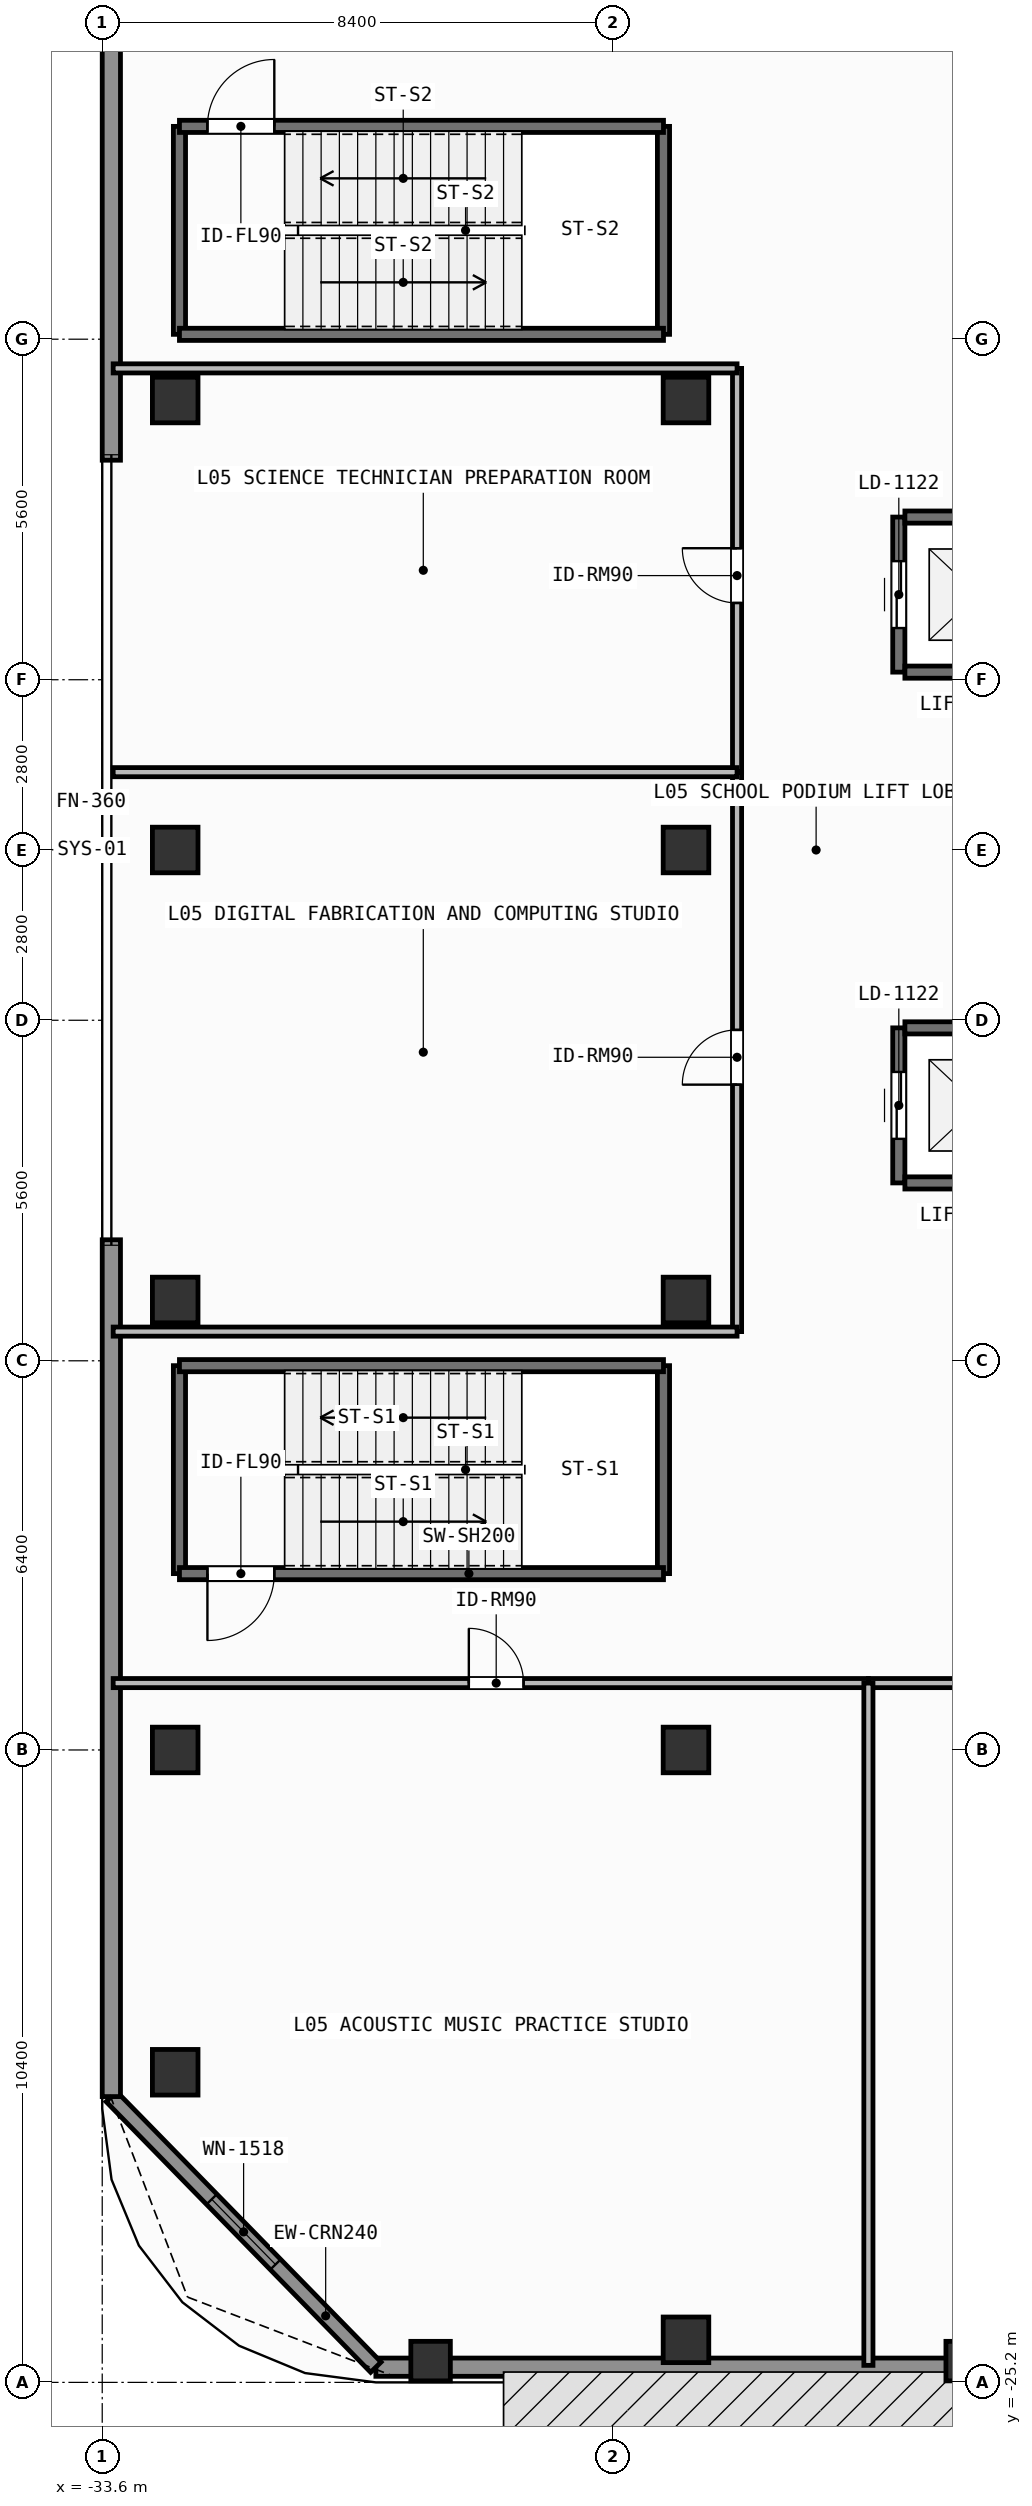
"""IFC4 building model, lengths in metres.
Left out: names, types, materials, properties, quantities, classifications, styles, units other than length and angle.
Written with IfcOpenShell. Run it as: python <this file> out.ifc"""

import sys

from ifc_helpers import new_model, si_unit, direction, frame, frame_2d, origin, origin_2d, place, context, subcontext, project, spatial, rectangle, extrude, element, fill, save


model = new_model("IFC4")
c1 = context("Model", 3, precision=1e-05, world=origin(), true_north=direction((0.0, 1.0)))
c2 = subcontext(c1, "Body", "Model", "MODEL_VIEW")
j1 = project(units=[si_unit("LENGTHUNIT", "METRE"), si_unit("PLANEANGLEUNIT", "RADIAN")], contexts=[c1])
p1 = place(None, origin())
s1 = spatial("IfcSite", under=j1, at=p1, CompositionType="ELEMENT")
p2 = place(p1, origin())
s2 = spatial("IfcBuilding", under=s1, at=p2, CompositionType="ELEMENT")
p3 = place(p2, frame((0.0, 0.0, 17.4)))
s3 = spatial("IfcBuildingStorey", under=s2, at=p3, CompositionType="ELEMENT", Elevation=17.4)
for number, where, z_axis, x_axis in (
    (1, (-32.4, -14.8, 0.0), (0.0, 0.0, 1.0), (1.0, 0.0, 0.0)),
    (2, (-32.4, -7.4, 0.0), (0.0, 0.0, 1.0), (1.0, 0.0, 0.0)),
    (3, (-32.4, 0.0, 0.0), (0.0, 0.0, 1.0), (1.0, 0.0, 0.0)),
    (4, (-32.4, 7.4, 0.0), (0.0, 0.0, 1.0), (1.0, 0.0, 0.0)),
    (5, (-24.0, -24.5, 0.0), (0.0, 0.0, 1.0), (1.0, 0.0, 0.0)),
    (6, (-24.0, -14.8, 0.0), (0.0, 0.0, 1.0), (1.0, 0.0, 0.0)),
    (7, (-24.0, -7.4, 0.0), (0.0, 0.0, 1.0), (1.0, 0.0, 0.0)),
    (8, (-24.0, 0.0, 0.0), (0.0, 0.0, 1.0), (1.0, 0.0, 0.0)),
    (9, (-24.0, 7.4, 0.0), (0.0, 0.0, 1.0), (1.0, 0.0, 0.0)),
    (10, (-32.4, -20.1, 0.0), (0.0, 0.0, 1.0), (1.0, 0.0, 0.0)),
):
    element("IfcColumn", number, at=place(p3, frame(where, z_axis=z_axis, x_axis=x_axis)), inside=s3, PredefinedType="COLUMN", context=c2, shape_type="SweptSolid", body=[
        extrude(rectangle(XDim=0.75, YDim=0.75, at=origin_2d()), origin(), (0.0, 0.0, 1.0), 4.2),
    ])
for number, where, z_axis, x_axis in (
    (11, (-28.2, -24.85, 0.0), (0.0, 0.0, 1.0), (1.0, 0.0, 0.0)),
    (12, (-19.4, -24.85, 0.0), (0.0, 0.0, 1.0), (1.0, 0.0, 0.0)),
):
    element("IfcColumn", number, at=place(p3, frame(where, z_axis=z_axis, x_axis=x_axis)), inside=s3, PredefinedType="PILASTER", context=c2, shape_type="SweptSolid", body=[
        extrude(rectangle(XDim=0.65, YDim=0.65, at=origin_2d()), origin(), (0.0, 0.0, 1.0), 4.2),
    ])
p4 = place(p3, frame((29.1, -24.95, 0.0), z_axis=(0.0, 0.0, 1.0), x_axis=(-1.0, 0.0, 0.0)))
e13 = element("IfcWall", 13, at=p4, inside=s3, PredefinedType="SOLIDWALL", context=c2, shape_type="SweptSolid", body=[
    extrude(rectangle(XDim=58.2, YDim=0.3, at=frame_2d((29.1, 0.0))), origin(), (0.0, 0.0, 1.0), 3.96),
])
p5 = place(p4, frame((39.825, 0.0, 0.85)))
e14 = element("IfcOpeningElement", 14, at=p5, cuts=e13, PredefinedType="OPENING", context=c2, shape_type="SweptSolid", body=[
    extrude(rectangle(XDim=2.1, YDim=2.2, at=frame_2d((1.05, 1.1))), frame((0.0, 0.16, 0.0), z_axis=(0.0, -1.0, 0.0), x_axis=(1.0, 0.0, 0.0)), (0.0, 0.0, 1.0), 0.32),
])
p6 = place(p4, frame((31.75, 0.0, 0.85)))
e15 = element("IfcOpeningElement", 15, at=p6, cuts=e13, PredefinedType="OPENING", context=c2, shape_type="SweptSolid", body=[
    extrude(rectangle(XDim=2.1, YDim=2.2, at=frame_2d((1.05, 1.1))), frame((0.0, 0.16, 0.0), z_axis=(0.0, -1.0, 0.0), x_axis=(1.0, 0.0, 0.0)), (0.0, 0.0, 1.0), 0.32),
])
p7 = place(p4, frame((24.35, 0.0, 0.85)))
e16 = element("IfcOpeningElement", 16, at=p7, cuts=e13, PredefinedType="OPENING", context=c2, shape_type="SweptSolid", body=[
    extrude(rectangle(XDim=2.1, YDim=2.2, at=frame_2d((1.05, 1.1))), frame((0.0, 0.16, 0.0), z_axis=(0.0, -1.0, 0.0), x_axis=(1.0, 0.0, 0.0)), (0.0, 0.0, 1.0), 0.32),
])
p8 = place(p4, frame((18.425, 0.0, 0.85)))
e17 = element("IfcOpeningElement", 17, at=p8, cuts=e13, PredefinedType="OPENING", context=c2, shape_type="SweptSolid", body=[
    extrude(rectangle(XDim=2.1, YDim=2.2, at=frame_2d((1.05, 1.1))), frame((0.0, 0.16, 0.0), z_axis=(0.0, -1.0, 0.0), x_axis=(1.0, 0.0, 0.0)), (0.0, 0.0, 1.0), 0.32),
])
p9 = place(p3, frame((-29.1, -24.95, 0.0), z_axis=(0.0, 0.0, 1.0), x_axis=(-0.69901822973, 0.715103848756, 0.0)))
e18 = element("IfcWall", 18, at=p9, inside=s3, PredefinedType="SOLIDWALL", context=c2, shape_type="SweptSolid", body=[
    extrude(rectangle(XDim=6.223, YDim=0.24, at=frame_2d((3.111, 0.0))), origin(), (0.0, 0.0, 1.0), 3.96),
])
p10 = place(p9, frame((2.362, 0.0, 0.85)))
e19 = element("IfcOpeningElement", 19, at=p10, cuts=e18, PredefinedType="OPENING", context=c2, shape_type="SweptSolid", body=[
    extrude(rectangle(XDim=1.5, YDim=1.85, at=frame_2d((0.75, 0.925))), frame((0.0, 0.13, 0.0), z_axis=(0.0, -1.0, 0.0), x_axis=(1.0, 0.0, 0.0)), (0.0, 0.0, 1.0), 0.26),
])
for number, where, z_axis, x_axis in (
    (20, (-33.45, -20.5, 0.0), (0.0, 0.0, 1.0), (0.0, 1.0, 0.0)),
    (21, (-33.45, 6.41, 0.0), (0.0, 0.0, 1.0), (0.0, 1.0, 0.0)),
):
    element("IfcWall", number, at=place(p3, frame(where, z_axis=z_axis, x_axis=x_axis)), inside=s3, PredefinedType="SOLIDWALL", context=c2, shape_type="SweptSolid", body=[
        extrude(rectangle(XDim=14.09, YDim=0.3, at=frame_2d((7.045, 0.0))), origin(), (0.0, 0.0, 1.0), 3.96),
    ])
p11 = place(p3, frame((-20.5, -5.475, 0.0), z_axis=(0.0, 0.0, 1.0), x_axis=(0.0, 1.0, 0.0)))
e22 = element("IfcWall", 22, at=p11, inside=s3, PredefinedType="SHEAR", context=c2, shape_type="SweptSolid", body=[
    extrude(rectangle(XDim=2.55, YDim=0.2, at=frame_2d((1.275, 0.0))), origin(), (0.0, 0.0, 1.0), 3.96),
])
p12 = place(p11, frame((0.725, 0.0, 0.0)))
e23 = element("IfcOpeningElement", 23, at=p12, cuts=e22, PredefinedType="OPENING", context=c2, shape_type="SweptSolid", body=[
    extrude(rectangle(XDim=1.1, YDim=2.2, at=frame_2d((0.55, 1.1))), frame((0.0, 0.11, 0.0), z_axis=(0.0, -1.0, 0.0), x_axis=(1.0, 0.0, 0.0)), (0.0, 0.0, 1.0), 0.22),
])
for number, where, z_axis, x_axis in (
    (24, (-20.4, -5.475, 0.0), (0.0, 0.0, 1.0), (1.0, 0.0, 0.0)),
    (25, (-20.4, -2.925, 0.0), (0.0, 0.0, 1.0), (1.0, 0.0, 0.0)),
):
    element("IfcWall", number, at=place(p3, frame(where, z_axis=z_axis, x_axis=x_axis)), inside=s3, PredefinedType="SHEAR", context=c2, shape_type="SweptSolid", body=[
        extrude(rectangle(XDim=2.4, YDim=0.2, at=frame_2d((1.2, 0.0))), origin(), (0.0, 0.0, 1.0), 3.96),
    ])
p13 = place(p3, frame((-20.5, 2.925, 0.0), z_axis=(0.0, 0.0, 1.0), x_axis=(0.0, 1.0, 0.0)))
e26 = element("IfcWall", 26, at=p13, inside=s3, PredefinedType="SHEAR", context=c2, shape_type="SweptSolid", body=[
    extrude(rectangle(XDim=2.55, YDim=0.2, at=frame_2d((1.275, 0.0))), origin(), (0.0, 0.0, 1.0), 3.96),
])
p14 = place(p13, frame((0.725, 0.0, 0.0)))
e27 = element("IfcOpeningElement", 27, at=p14, cuts=e26, PredefinedType="OPENING", context=c2, shape_type="SweptSolid", body=[
    extrude(rectangle(XDim=1.1, YDim=2.2, at=frame_2d((0.55, 1.1))), frame((0.0, 0.11, 0.0), z_axis=(0.0, -1.0, 0.0), x_axis=(1.0, 0.0, 0.0)), (0.0, 0.0, 1.0), 0.22),
])
for number, where, z_axis, x_axis in (
    (28, (-20.4, 2.925, 0.0), (0.0, 0.0, 1.0), (1.0, 0.0, 0.0)),
    (29, (-20.4, 5.475, 0.0), (0.0, 0.0, 1.0), (1.0, 0.0, 0.0)),
):
    element("IfcWall", number, at=place(p3, frame(where, z_axis=z_axis, x_axis=x_axis)), inside=s3, PredefinedType="SHEAR", context=c2, shape_type="SweptSolid", body=[
        extrude(rectangle(XDim=2.4, YDim=0.2, at=frame_2d((1.2, 0.0))), origin(), (0.0, 0.0, 1.0), 3.96),
    ])
for number, where, z_axis, x_axis in (
    (30, (-32.33, -11.9, 0.0), (0.0, 0.0, 1.0), (0.0, 1.0, 0.0)),
    (31, (-24.37, -8.48, 0.0), (0.0, 0.0, 1.0), (0.0, -1.0, 0.0)),
):
    element("IfcWall", number, at=place(p3, frame(where, z_axis=z_axis, x_axis=x_axis)), inside=s3, PredefinedType="SHEAR", context=c2, shape_type="SweptSolid", body=[
        extrude(rectangle(XDim=3.42, YDim=0.2, at=frame_2d((1.71, 0.0))), origin(), (0.0, 0.0, 1.0), 3.96),
    ])
p15 = place(p3, frame((-24.37, -11.9, 0.0), z_axis=(0.0, 0.0, 1.0), x_axis=(-1.0, 0.0, 0.0)))
e32 = element("IfcWall", 32, at=p15, inside=s3, PredefinedType="SHEAR", context=c2, shape_type="SweptSolid", body=[
    extrude(rectangle(XDim=7.96, YDim=0.2, at=frame_2d((3.98, 0.0))), origin(), (0.0, 0.0, 1.0), 3.96),
])
p16 = place(p15, frame((6.4, 0.0, 0.0)))
e33 = element("IfcOpeningElement", 33, at=p16, cuts=e32, PredefinedType="OPENING", context=c2, shape_type="SweptSolid", body=[
    extrude(rectangle(XDim=1.1, YDim=2.15, at=frame_2d((0.55, 1.075))), frame((0.0, 0.11, 0.0), z_axis=(0.0, -1.0, 0.0), x_axis=(1.0, 0.0, 0.0)), (0.0, 0.0, 1.0), 0.22),
])
p17 = place(p3, frame((-32.33, -8.48, 0.0), z_axis=(0.0, 0.0, 1.0), x_axis=(1.0, 0.0, 0.0)))
e34 = element("IfcWall", 34, at=p17, inside=s3, PredefinedType="SHEAR", context=c2, shape_type="SweptSolid", body=[
    extrude(rectangle(XDim=7.96, YDim=0.2, at=frame_2d((3.98, 0.0))), origin(), (0.0, 0.0, 1.0), 3.96),
])
for number, where, z_axis, x_axis in (
    (35, (-32.33, 8.48, 0.0), (0.0, 0.0, 1.0), (0.0, 1.0, 0.0)),
    (36, (-24.37, 11.9, 0.0), (0.0, 0.0, 1.0), (0.0, -1.0, 0.0)),
):
    element("IfcWall", number, at=place(p3, frame(where, z_axis=z_axis, x_axis=x_axis)), inside=s3, PredefinedType="SHEAR", context=c2, shape_type="SweptSolid", body=[
        extrude(rectangle(XDim=3.42, YDim=0.2, at=frame_2d((1.71, 0.0))), origin(), (0.0, 0.0, 1.0), 3.96),
    ])
p18 = place(p3, frame((-24.37, 8.48, 0.0), z_axis=(0.0, 0.0, 1.0), x_axis=(-1.0, 0.0, 0.0)))
e37 = element("IfcWall", 37, at=p18, inside=s3, PredefinedType="SHEAR", context=c2, shape_type="SweptSolid", body=[
    extrude(rectangle(XDim=7.96, YDim=0.2, at=frame_2d((3.98, 0.0))), origin(), (0.0, 0.0, 1.0), 3.96),
])
p19 = place(p3, frame((-32.33, 11.9, 0.0), z_axis=(0.0, 0.0, 1.0), x_axis=(1.0, 0.0, 0.0)))
e38 = element("IfcWall", 38, at=p19, inside=s3, PredefinedType="SHEAR", context=c2, shape_type="SweptSolid", body=[
    extrude(rectangle(XDim=7.96, YDim=0.2, at=frame_2d((3.98, 0.0))), origin(), (0.0, 0.0, 1.0), 3.96),
])
p20 = place(p19, frame((0.46, 0.0, 0.0)))
e39 = element("IfcOpeningElement", 39, at=p20, cuts=e38, PredefinedType="OPENING", context=c2, shape_type="SweptSolid", body=[
    extrude(rectangle(XDim=1.1, YDim=2.15, at=frame_2d((0.55, 1.075))), frame((0.0, 0.11, 0.0), z_axis=(0.0, -1.0, 0.0), x_axis=(1.0, 0.0, 0.0)), (0.0, 0.0, 1.0), 0.22),
])
p21 = place(p3, frame((-23.16, -7.92, 0.0), z_axis=(0.0, 0.0, 1.0), x_axis=(0.0, 1.0, 0.0)))
e40 = element("IfcWall", 40, at=p21, inside=s3, PredefinedType="PARTITIONING", context=c2, shape_type="SweptSolid", body=[
    extrude(rectangle(XDim=9.2, YDim=0.15, at=frame_2d((4.6, 0.0))), origin(), (0.0, 0.0, 1.0), 3.96),
])
p22 = place(p21, frame((4.061, 0.0, 0.0)))
e41 = element("IfcOpeningElement", 41, at=p22, cuts=e40, PredefinedType="OPENING", context=c2, shape_type="SweptSolid", body=[
    extrude(rectangle(XDim=0.9, YDim=2.1, at=frame_2d((0.45, 1.05))), frame((0.0, 0.085, 0.0), z_axis=(0.0, -1.0, 0.0), x_axis=(1.0, 0.0, 0.0)), (0.0, 0.0, 1.0), 0.17),
])
p23 = place(p3, frame((-23.16, 1.28, 0.0), z_axis=(0.0, 0.0, 1.0), x_axis=(0.0, 1.0, 0.0)))
e42 = element("IfcWall", 42, at=p23, inside=s3, PredefinedType="PARTITIONING", context=c2, shape_type="SweptSolid", body=[
    extrude(rectangle(XDim=6.64, YDim=0.15, at=frame_2d((3.32, 0.0))), origin(), (0.0, 0.0, 1.0), 3.96),
])
p24 = place(p23, frame((2.783, 0.0, 0.0)))
e43 = element("IfcOpeningElement", 43, at=p24, cuts=e42, PredefinedType="OPENING", context=c2, shape_type="SweptSolid", body=[
    extrude(rectangle(XDim=0.9, YDim=2.1, at=frame_2d((0.45, 1.05))), frame((0.0, 0.085, 0.0), z_axis=(0.0, -1.0, 0.0), x_axis=(1.0, 0.0, 0.0)), (0.0, 0.0, 1.0), 0.17),
])
p25 = place(p3, frame((-33.42, -13.7, 0.0), z_axis=(0.0, 0.0, 1.0), x_axis=(1.0, 0.0, 0.0)))
e44 = element("IfcWall", 44, at=p25, inside=s3, PredefinedType="PARTITIONING", context=c2, shape_type="SweptSolid", body=[
    extrude(rectangle(XDim=12.42, YDim=0.15, at=frame_2d((6.21, 0.0))), origin(), (0.0, 0.0, 1.0), 3.96),
])
p26 = place(p25, frame((5.849, 0.0, 0.0)))
e45 = element("IfcOpeningElement", 45, at=p26, cuts=e44, PredefinedType="OPENING", context=c2, shape_type="SweptSolid", body=[
    extrude(rectangle(XDim=0.9, YDim=2.1, at=frame_2d((0.45, 1.05))), frame((0.0, 0.085, 0.0), z_axis=(0.0, -1.0, 0.0), x_axis=(1.0, 0.0, 0.0)), (0.0, 0.0, 1.0), 0.17),
])
p27 = place(p3, frame((-21.0, -13.7, 0.0), z_axis=(0.0, 0.0, 1.0), x_axis=(1.0, 0.0, 0.0)))
e46 = element("IfcWall", 46, at=p27, inside=s3, PredefinedType="PARTITIONING", context=c2, shape_type="SweptSolid", body=[
    extrude(rectangle(XDim=11.8, YDim=0.15, at=frame_2d((5.9, 0.0))), origin(), (0.0, 0.0, 1.0), 3.96),
])
p28 = place(p27, frame((4.464, 0.0, 0.0)))
e47 = element("IfcOpeningElement", 47, at=p28, cuts=e46, PredefinedType="OPENING", context=c2, shape_type="SweptSolid", body=[
    extrude(rectangle(XDim=0.9, YDim=2.1, at=frame_2d((0.45, 1.05))), frame((0.0, 0.085, 0.0), z_axis=(0.0, -1.0, 0.0), x_axis=(1.0, 0.0, 0.0)), (0.0, 0.0, 1.0), 0.17),
])
for number, where, z_axis, x_axis in (
    (48, (-33.42, -7.92, 0.0), (0.0, 0.0, 1.0), (1.0, 0.0, 0.0)),
    (49, (-33.42, 7.92, 0.0), (0.0, 0.0, 1.0), (1.0, 0.0, 0.0)),
    (50, (-33.42, 1.28, 0.0), (0.0, 0.0, 1.0), (1.0, 0.0, 0.0)),
):
    element("IfcWall", number, at=place(p3, frame(where, z_axis=z_axis, x_axis=x_axis)), inside=s3, PredefinedType="PARTITIONING", context=c2, shape_type="SweptSolid", body=[
        extrude(rectangle(XDim=10.26, YDim=0.15, at=frame_2d((5.13, 0.0))), origin(), (0.0, 0.0, 1.0), 3.96),
    ])
p29 = place(p3, frame((-21.0, -24.92, 0.0), z_axis=(0.0, 0.0, 1.0), x_axis=(0.0, 1.0, 0.0)))
e51 = element("IfcWall", 51, at=p29, inside=s3, PredefinedType="PARTITIONING", context=c2, shape_type="SweptSolid", body=[
    extrude(rectangle(XDim=11.22, YDim=0.15, at=frame_2d((5.61, 0.0))), origin(), (0.0, 0.0, 1.0), 3.96),
])
p30 = place(p10, origin())
e52 = element("IfcWindow", 52, at=p30, inside=s3, PartitioningType="SINGLE_PANEL", PredefinedType="WINDOW", context=c2, shape_type="SweptSolid", body=[
    extrude(rectangle(XDim=1.5, YDim=1.85, at=frame_2d((0.75, 0.925))), frame((0.0, 0.03, 0.0), z_axis=(0.0, -1.0, 0.0), x_axis=(1.0, 0.0, 0.0)), (0.0, 0.0, 1.0), 0.06),
])
fill(e19, e52)
p31 = place(p12, origin())
e53 = element("IfcDoor", 53, at=p31, inside=s3, OperationType="SLIDING_TO_LEFT", PredefinedType="DOOR", context=c2, shape_type="SweptSolid", body=[
    extrude(rectangle(XDim=1.1, YDim=2.2, at=frame_2d((0.55, 1.1))), frame((0.0, 0.025, 0.0), z_axis=(0.0, -1.0, 0.0), x_axis=(1.0, 0.0, 0.0)), (0.0, 0.0, 1.0), 0.05),
])
fill(e23, e53)
p32 = place(p14, origin())
e54 = element("IfcDoor", 54, at=p32, inside=s3, OperationType="SLIDING_TO_LEFT", PredefinedType="DOOR", context=c2, shape_type="SweptSolid", body=[
    extrude(rectangle(XDim=1.1, YDim=2.2, at=frame_2d((0.55, 1.1))), frame((0.0, 0.025, 0.0), z_axis=(0.0, -1.0, 0.0), x_axis=(1.0, 0.0, 0.0)), (0.0, 0.0, 1.0), 0.05),
])
fill(e27, e54)
p33 = place(p16, origin())
e55 = element("IfcDoor", 55, at=p33, inside=s3, OperationType="SINGLE_SWING_RIGHT", PredefinedType="DOOR", context=c2, shape_type="SweptSolid", body=[
    extrude(rectangle(XDim=1.1, YDim=2.15, at=frame_2d((0.55, 1.075))), frame((0.0, 0.025, 0.0), z_axis=(0.0, -1.0, 0.0), x_axis=(1.0, 0.0, 0.0)), (0.0, 0.0, 1.0), 0.05),
])
fill(e33, e55)
p34 = place(p20, origin())
e56 = element("IfcDoor", 56, at=p34, inside=s3, OperationType="SINGLE_SWING_RIGHT", PredefinedType="DOOR", context=c2, shape_type="SweptSolid", body=[
    extrude(rectangle(XDim=1.1, YDim=2.15, at=frame_2d((0.55, 1.075))), frame((0.0, 0.025, 0.0), z_axis=(0.0, -1.0, 0.0), x_axis=(1.0, 0.0, 0.0)), (0.0, 0.0, 1.0), 0.05),
])
fill(e39, e56)
p35 = place(p22, origin())
e57 = element("IfcDoor", 57, at=p35, inside=s3, OperationType="SINGLE_SWING_LEFT", PredefinedType="DOOR", context=c2, shape_type="SweptSolid", body=[
    extrude(rectangle(XDim=0.9, YDim=2.1, at=frame_2d((0.45, 1.05))), frame((0.0, 0.025, 0.0), z_axis=(0.0, -1.0, 0.0), x_axis=(1.0, 0.0, 0.0)), (0.0, 0.0, 1.0), 0.05),
])
fill(e41, e57)
p36 = place(p24, origin())
e58 = element("IfcDoor", 58, at=p36, inside=s3, OperationType="SINGLE_SWING_RIGHT", PredefinedType="DOOR", context=c2, shape_type="SweptSolid", body=[
    extrude(rectangle(XDim=0.9, YDim=2.1, at=frame_2d((0.45, 1.05))), frame((0.0, 0.025, 0.0), z_axis=(0.0, -1.0, 0.0), x_axis=(1.0, 0.0, 0.0)), (0.0, 0.0, 1.0), 0.05),
])
fill(e43, e58)
p37 = place(p26, origin())
e59 = element("IfcDoor", 59, at=p37, inside=s3, OperationType="SINGLE_SWING_LEFT", PredefinedType="DOOR", context=c2, shape_type="SweptSolid", body=[
    extrude(rectangle(XDim=0.9, YDim=2.1, at=frame_2d((0.45, 1.05))), frame((0.0, 0.025, 0.0), z_axis=(0.0, -1.0, 0.0), x_axis=(1.0, 0.0, 0.0)), (0.0, 0.0, 1.0), 0.05),
])
fill(e45, e59)
save(model, sys.argv[1])
